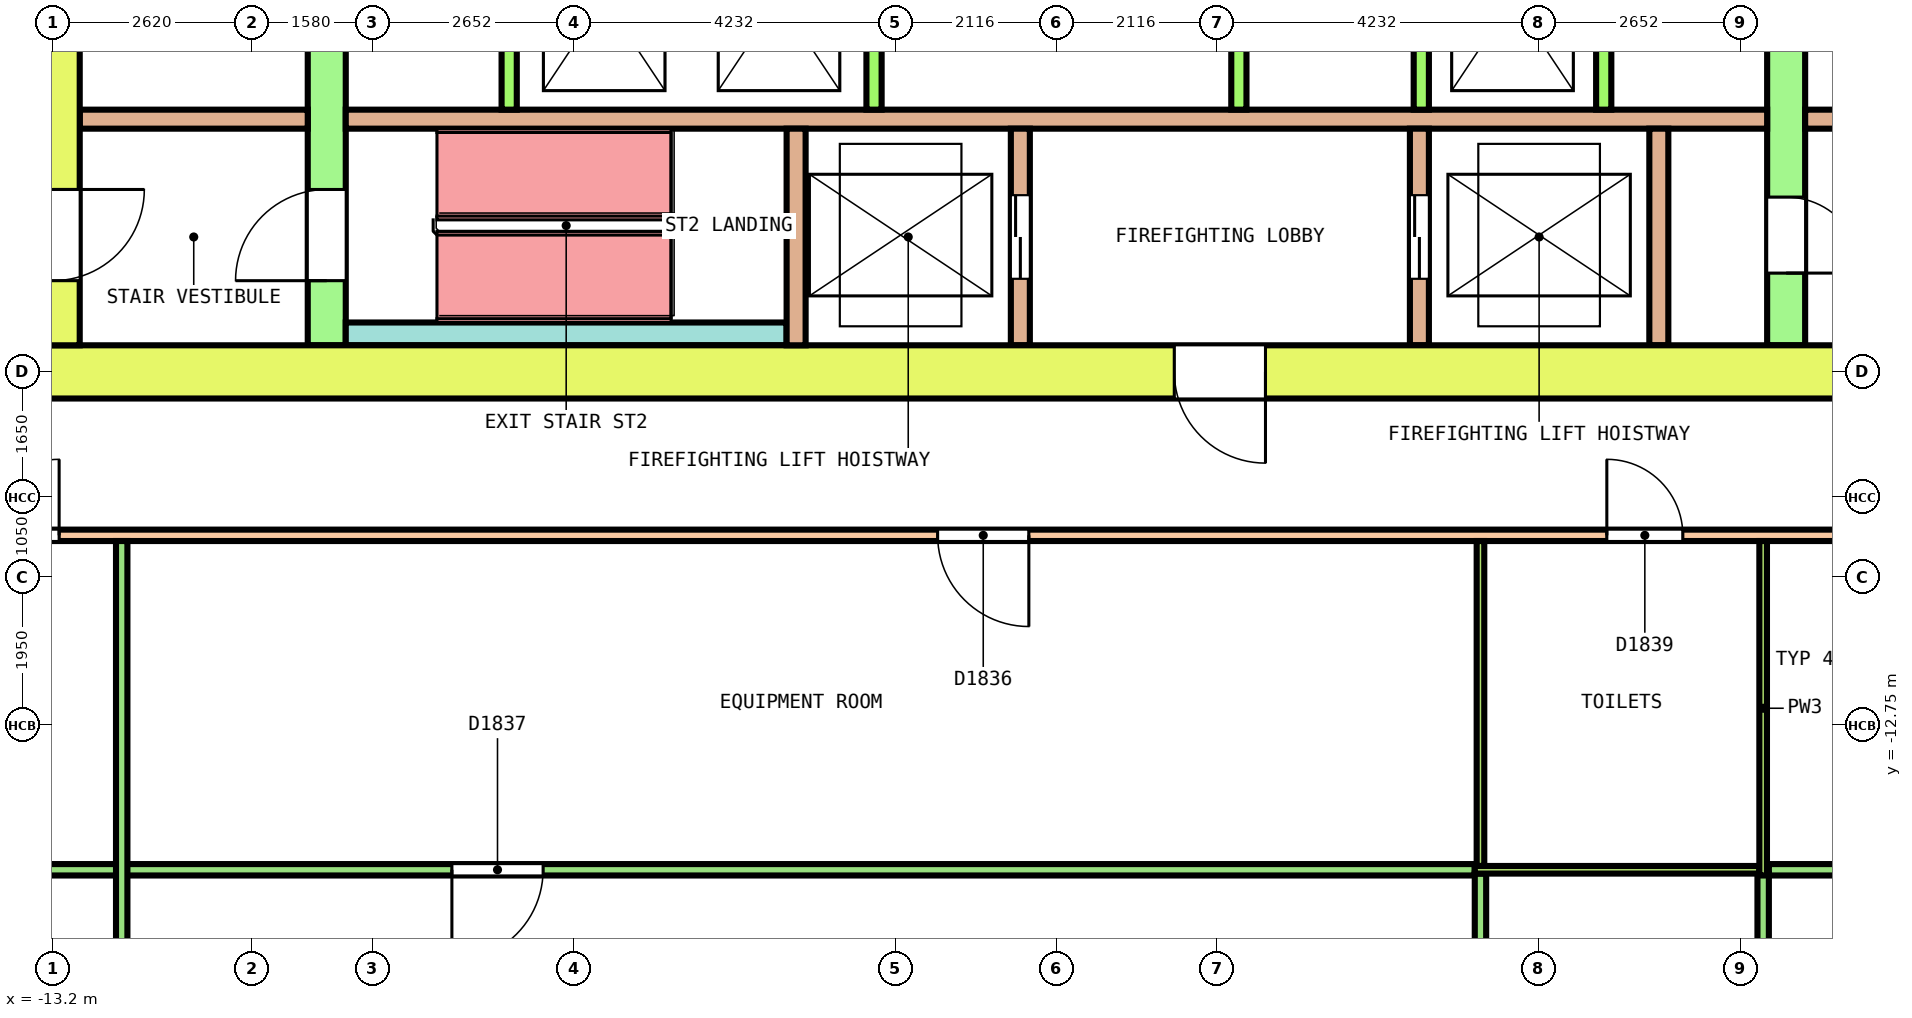
"""IFC4 building model, lengths in metres.
Left out: names, types, materials, properties, quantities, classifications, styles, units other than length and angle.
Written with IfcOpenShell. Run it as: python <this file> out.ifc"""

import sys

from ifc_helpers import new_model, si_unit, direction, frame, frame_2d, origin, place, context, subcontext, project, spatial, rectangle, extrude, element, fill, save


model = new_model("IFC4")
c1 = context("Model", 3, precision=1e-05, world=origin(), true_north=direction((0.0, 1.0)))
c2 = subcontext(c1, "Body", "Model", "MODEL_VIEW")
j1 = project(units=[si_unit("LENGTHUNIT", "METRE"), si_unit("PLANEANGLEUNIT", "RADIAN")], contexts=[c1])
p1 = place(None, origin())
s1 = spatial("IfcSite", under=j1, at=p1, CompositionType="ELEMENT")
p2 = place(p1, origin())
s2 = spatial("IfcBuilding", under=s1, at=p2, CompositionType="ELEMENT")
p3 = place(p2, frame((0.0, 0.0, 176.0)))
s3 = spatial("IfcBuildingStorey", under=s2, at=p3, CompositionType="ELEMENT", Elevation=176.0)
p4 = place(p3, frame((-13.55, -8.1, 0.0), z_axis=(0.0, 0.0, 1.0), x_axis=(1.0, 0.0, 0.0)))
e1 = element("IfcWall", 1, at=p4, inside=s3, PredefinedType="SHEAR", context=c2, shape_type="SweptSolid", body=[
    extrude(rectangle(XDim=27.1, YDim=0.7, at=frame_2d((13.55, 0.0))), origin(), (0.0, 0.0, 1.0), 4.1),
])
p5 = place(p4, frame((15.1, 0.0, 0.0)))
e2 = element("IfcOpeningElement", 2, at=p5, cuts=e1, PredefinedType="OPENING", context=c2, shape_type="SweptSolid", body=[
    extrude(rectangle(XDim=1.2, YDim=2.1, at=frame_2d((0.6, 1.05))), frame((0.0, 0.36, 0.0), z_axis=(0.0, -1.0, 0.0), x_axis=(1.0, 0.0, 0.0)), (0.0, 0.0, 1.0), 0.72),
])
p6 = place(p3, frame((-13.2, -7.75, 0.0), z_axis=(0.0, 0.0, 1.0), x_axis=(0.0, 1.0, 0.0)))
e3 = element("IfcWall", 3, at=p6, inside=s3, PredefinedType="SHEAR", context=c2, shape_type="SweptSolid", body=[
    extrude(rectangle(XDim=15.5, YDim=0.7, at=frame_2d((7.75, 0.0))), origin(), (0.0, 0.0, 1.0), 4.1),
])
p7 = place(p6, frame((6.55, 0.0, 0.0)))
e4 = element("IfcOpeningElement", 4, at=p7, cuts=e3, PredefinedType="OPENING", context=c2, shape_type="SweptSolid", body=[
    extrude(rectangle(XDim=2.4, YDim=2.1, at=frame_2d((1.2, 1.05))), frame((0.0, 0.36, 0.0), z_axis=(0.0, -1.0, 0.0), x_axis=(1.0, 0.0, 0.0)), (0.0, 0.0, 1.0), 0.72),
])
p8 = place(p6, frame((13.45, 0.0, 0.0)))
e5 = element("IfcOpeningElement", 5, at=p8, cuts=e3, PredefinedType="OPENING", context=c2, shape_type="SweptSolid", body=[
    extrude(rectangle(XDim=1.2, YDim=2.1, at=frame_2d((0.6, 1.05))), frame((0.0, 0.36, 0.0), z_axis=(0.0, -1.0, 0.0), x_axis=(1.0, 0.0, 0.0)), (0.0, 0.0, 1.0), 0.72),
])
p9 = place(p6, frame((0.85, 0.0, 0.0)))
e6 = element("IfcOpeningElement", 6, at=p9, cuts=e3, PredefinedType="OPENING", context=c2, shape_type="SweptSolid", body=[
    extrude(rectangle(XDim=1.2, YDim=2.1, at=frame_2d((0.6, 1.05))), frame((0.0, 0.36, 0.0), z_axis=(0.0, -1.0, 0.0), x_axis=(1.0, 0.0, 0.0)), (0.0, 0.0, 1.0), 0.72),
])
p10 = place(p3, frame((-9.6, -7.75, 0.0), z_axis=(0.0, 0.0, 1.0), x_axis=(0.0, 1.0, 0.0)))
e7 = element("IfcWall", 7, at=p10, inside=s3, PredefinedType="SHEAR", context=c2, shape_type="SweptSolid", body=[
    extrude(rectangle(XDim=15.5, YDim=0.5, at=frame_2d((7.75, 0.0))), origin(), (0.0, 0.0, 1.0), 4.1),
])
p11 = place(p10, frame((6.55, 0.0, 0.0)))
e8 = element("IfcOpeningElement", 8, at=p11, cuts=e7, PredefinedType="OPENING", context=c2, shape_type="SweptSolid", body=[
    extrude(rectangle(XDim=2.4, YDim=2.1, at=frame_2d((1.2, 1.05))), frame((0.0, 0.26, 0.0), z_axis=(0.0, -1.0, 0.0), x_axis=(1.0, 0.0, 0.0)), (0.0, 0.0, 1.0), 0.52),
])
p12 = place(p10, frame((13.45, 0.0, 0.0)))
e9 = element("IfcOpeningElement", 9, at=p12, cuts=e7, PredefinedType="OPENING", context=c2, shape_type="SweptSolid", body=[
    extrude(rectangle(XDim=1.2, YDim=2.1, at=frame_2d((0.6, 1.05))), frame((0.0, 0.26, 0.0), z_axis=(0.0, -1.0, 0.0), x_axis=(1.0, 0.0, 0.0)), (0.0, 0.0, 1.0), 0.52),
])
p13 = place(p10, frame((0.85, 0.0, 0.0)))
e10 = element("IfcOpeningElement", 10, at=p13, cuts=e7, PredefinedType="OPENING", context=c2, shape_type="SweptSolid", body=[
    extrude(rectangle(XDim=1.2, YDim=2.1, at=frame_2d((0.6, 1.05))), frame((0.0, 0.26, 0.0), z_axis=(0.0, -1.0, 0.0), x_axis=(1.0, 0.0, 0.0)), (0.0, 0.0, 1.0), 0.52),
])
p14 = place(p3, frame((9.6, -7.75, 0.0), z_axis=(0.0, 0.0, 1.0), x_axis=(0.0, 1.0, 0.0)))
e11 = element("IfcWall", 11, at=p14, inside=s3, PredefinedType="SHEAR", context=c2, shape_type="SweptSolid", body=[
    extrude(rectangle(XDim=15.5, YDim=0.5, at=frame_2d((7.75, 0.0))), origin(), (0.0, 0.0, 1.0), 4.1),
])
p15 = place(p14, frame((6.55, 0.0, 0.0)))
e12 = element("IfcOpeningElement", 12, at=p15, cuts=e11, PredefinedType="OPENING", context=c2, shape_type="SweptSolid", body=[
    extrude(rectangle(XDim=2.4, YDim=2.1, at=frame_2d((1.2, 1.05))), frame((0.0, 0.26, 0.0), z_axis=(0.0, -1.0, 0.0), x_axis=(1.0, 0.0, 0.0)), (0.0, 0.0, 1.0), 0.52),
])
p16 = place(p14, frame((13.45, 0.0, 0.0)))
e13 = element("IfcOpeningElement", 13, at=p16, cuts=e11, PredefinedType="OPENING", context=c2, shape_type="SweptSolid", body=[
    extrude(rectangle(XDim=1.2, YDim=2.1, at=frame_2d((0.6, 1.05))), frame((0.0, 0.26, 0.0), z_axis=(0.0, -1.0, 0.0), x_axis=(1.0, 0.0, 0.0)), (0.0, 0.0, 1.0), 0.52),
])
p17 = place(p14, frame((0.95, 0.0, 0.0)))
e14 = element("IfcOpeningElement", 14, at=p17, cuts=e11, PredefinedType="OPENING", context=c2, shape_type="SweptSolid", body=[
    extrude(rectangle(XDim=1.0, YDim=2.1, at=frame_2d((0.5, 1.05))), frame((0.0, 0.26, 0.0), z_axis=(0.0, -1.0, 0.0), x_axis=(1.0, 0.0, 0.0)), (0.0, 0.0, 1.0), 0.52),
])
p18 = place(p3, frame((-12.85, -4.775, 0.0), z_axis=(0.0, 0.0, 1.0), x_axis=(1.0, 0.0, 0.0)))
e15 = element("IfcWall", 15, at=p18, inside=s3, PredefinedType="SOLIDWALL", context=c2, shape_type="SweptSolid", body=[
    extrude(rectangle(XDim=3.0, YDim=0.25, at=frame_2d((1.5, 0.0))), origin(), (0.0, 0.0, 1.0), 4.1),
])
p19 = place(p3, frame((-9.35, -4.775, 0.0), z_axis=(0.0, 0.0, 1.0), x_axis=(1.0, 0.0, 0.0)))
e16 = element("IfcWall", 16, at=p19, inside=s3, PredefinedType="SOLIDWALL", context=c2, shape_type="SweptSolid", body=[
    extrude(rectangle(XDim=18.7, YDim=0.25, at=frame_2d((9.35, 0.0))), origin(), (0.0, 0.0, 1.0), 4.1),
])
p20 = place(p3, frame((9.85, -4.775, 0.0), z_axis=(0.0, 0.0, 1.0), x_axis=(1.0, 0.0, 0.0)))
e17 = element("IfcWall", 17, at=p20, inside=s3, PredefinedType="SOLIDWALL", context=c2, shape_type="SweptSolid", body=[
    extrude(rectangle(XDim=3.0, YDim=0.25, at=frame_2d((1.5, 0.0))), origin(), (0.0, 0.0, 1.0), 4.1),
])
for number, where, z_axis, x_axis in (
    (18, (-7.2, -4.65, 0.0), (0.0, 0.0, 1.0), (0.0, 1.0, 0.0)),
    (19, (-2.4, -4.65, 0.0), (0.0, 0.0, 1.0), (0.0, 1.0, 0.0)),
    (20, (2.4, -4.65, 0.0), (0.0, 0.0, 1.0), (0.0, 1.0, 0.0)),
    (21, (4.8, -4.65, 0.0), (0.0, 0.0, 1.0), (0.0, 1.0, 0.0)),
    (22, (7.2, -4.65, 0.0), (0.0, 0.0, 1.0), (0.0, 1.0, 0.0)),
):
    element("IfcWall", number, at=place(p3, frame(where, z_axis=z_axis, x_axis=x_axis)), inside=s3, PredefinedType="SOLIDWALL", context=c2, shape_type="SweptSolid", body=[
        extrude(rectangle(XDim=2.9, YDim=0.2, at=frame_2d((1.45, 0.0))), origin(), (0.0, 0.0, 1.0), 4.1),
    ])
p21 = place(p3, frame((-9.35, -7.6, 0.0), z_axis=(0.0, 0.0, 1.0), x_axis=(1.0, 0.0, 0.0)))
e23 = element("IfcWall", 23, at=p21, inside=s3, PredefinedType="SOLIDWALL", context=c2, shape_type="SweptSolid", body=[
    extrude(rectangle(XDim=5.8, YDim=0.3, at=frame_2d((2.9, 0.0))), origin(), (0.0, 0.0, 1.0), 4.1),
])
p22 = place(p3, frame((-3.425, -7.75, 0.0), z_axis=(0.0, 0.0, 1.0), x_axis=(0.0, 1.0, 0.0)))
e24 = element("IfcWall", 24, at=p22, inside=s3, PredefinedType="SOLIDWALL", context=c2, shape_type="SweptSolid", body=[
    extrude(rectangle(XDim=2.85, YDim=0.25, at=frame_2d((1.425, 0.0))), origin(), (0.0, 0.0, 1.0), 4.1),
])
p23 = place(p3, frame((-0.475, -7.75, 0.0), z_axis=(0.0, 0.0, 1.0), x_axis=(0.0, 1.0, 0.0)))
e25 = element("IfcWall", 25, at=p23, inside=s3, PredefinedType="SOLIDWALL", context=c2, shape_type="SweptSolid", body=[
    extrude(rectangle(XDim=2.85, YDim=0.25, at=frame_2d((1.425, 0.0))), origin(), (0.0, 0.0, 1.0), 4.1),
])
p24 = place(p23, frame((0.875, 0.0, 0.0)))
e26 = element("IfcOpeningElement", 26, at=p24, cuts=e25, PredefinedType="OPENING", context=c2, shape_type="SweptSolid", body=[
    extrude(rectangle(XDim=1.1, YDim=2.1, at=frame_2d((0.55, 1.05))), frame((0.0, 0.135, 0.0), z_axis=(0.0, -1.0, 0.0), x_axis=(1.0, 0.0, 0.0)), (0.0, 0.0, 1.0), 0.27),
])
p25 = place(p3, frame((4.775, -7.75, 0.0), z_axis=(0.0, 0.0, 1.0), x_axis=(0.0, 1.0, 0.0)))
e27 = element("IfcWall", 27, at=p25, inside=s3, PredefinedType="SOLIDWALL", context=c2, shape_type="SweptSolid", body=[
    extrude(rectangle(XDim=2.85, YDim=0.25, at=frame_2d((1.425, 0.0))), origin(), (0.0, 0.0, 1.0), 4.1),
])
p26 = place(p25, frame((0.875, 0.0, 0.0)))
e28 = element("IfcOpeningElement", 28, at=p26, cuts=e27, PredefinedType="OPENING", context=c2, shape_type="SweptSolid", body=[
    extrude(rectangle(XDim=1.1, YDim=2.1, at=frame_2d((0.55, 1.05))), frame((0.0, 0.135, 0.0), z_axis=(0.0, -1.0, 0.0), x_axis=(1.0, 0.0, 0.0)), (0.0, 0.0, 1.0), 0.27),
])
p27 = place(p3, frame((7.925, -7.75, 0.0), z_axis=(0.0, 0.0, 1.0), x_axis=(0.0, 1.0, 0.0)))
e29 = element("IfcWall", 29, at=p27, inside=s3, PredefinedType="SOLIDWALL", context=c2, shape_type="SweptSolid", body=[
    extrude(rectangle(XDim=2.85, YDim=0.25, at=frame_2d((1.425, 0.0))), origin(), (0.0, 0.0, 1.0), 4.1),
])
p28 = place(p3, frame((-15.275, -10.25, 0.0), z_axis=(0.0, 0.0, 1.0), x_axis=(1.0, 0.0, 0.0)))
e30 = element("IfcWall", 30, at=p28, inside=s3, PredefinedType="PARTITIONING", context=c2, shape_type="SweptSolid", body=[
    extrude(rectangle(XDim=30.575, YDim=0.15, at=frame_2d((15.288, 0.0))), origin(), (0.0, 0.0, 1.0), 3.05),
])
p29 = place(p28, frame((1.154, 0.0, 0.0)))
e31 = element("IfcOpeningElement", 31, at=p29, cuts=e30, PredefinedType="OPENING", context=c2, shape_type="SweptSolid", body=[
    extrude(rectangle(XDim=1.0, YDim=2.1, at=frame_2d((0.5, 1.05))), frame((0.0, 0.085, 0.0), z_axis=(0.0, -1.0, 0.0), x_axis=(1.0, 0.0, 0.0)), (0.0, 0.0, 1.0), 0.17),
])
p30 = place(p28, frame((13.712, 0.0, 0.0)))
e32 = element("IfcOpeningElement", 32, at=p30, cuts=e30, PredefinedType="OPENING", context=c2, shape_type="SweptSolid", body=[
    extrude(rectangle(XDim=1.2, YDim=2.1, at=frame_2d((0.6, 1.05))), frame((0.0, 0.085, 0.0), z_axis=(0.0, -1.0, 0.0), x_axis=(1.0, 0.0, 0.0)), (0.0, 0.0, 1.0), 0.17),
])
p31 = place(p28, frame((22.516, 0.0, 0.0)))
e33 = element("IfcOpeningElement", 33, at=p31, cuts=e30, PredefinedType="OPENING", context=c2, shape_type="SweptSolid", body=[
    extrude(rectangle(XDim=1.0, YDim=2.1, at=frame_2d((0.5, 1.05))), frame((0.0, 0.085, 0.0), z_axis=(0.0, -1.0, 0.0), x_axis=(1.0, 0.0, 0.0)), (0.0, 0.0, 1.0), 0.17),
])
p32 = place(p28, frame((28.187, 0.0, 0.0)))
e34 = element("IfcOpeningElement", 34, at=p32, cuts=e30, PredefinedType="OPENING", context=c2, shape_type="SweptSolid", body=[
    extrude(rectangle(XDim=1.0, YDim=2.1, at=frame_2d((0.5, 1.05))), frame((0.0, 0.085, 0.0), z_axis=(0.0, -1.0, 0.0), x_axis=(1.0, 0.0, 0.0)), (0.0, 0.0, 1.0), 0.17),
])
p33 = place(p3, frame((-19.024, -14.65, 0.0), z_axis=(0.0, 0.0, 1.0), x_axis=(1.0, 0.0, 0.0)))
e35 = element("IfcWall", 35, at=p33, inside=s3, PredefinedType="PARTITIONING", context=c2, shape_type="SweptSolid", body=[
    extrude(rectangle(XDim=24.527, YDim=0.15, at=frame_2d((12.264, 0.0))), origin(), (0.0, 0.0, 1.0), 3.05),
])
p34 = place(p33, frame((2.863, 0.0, 0.0)))
e36 = element("IfcOpeningElement", 36, at=p34, cuts=e35, PredefinedType="OPENING", context=c2, shape_type="SweptSolid", body=[
    extrude(rectangle(XDim=1.0, YDim=2.1, at=frame_2d((0.5, 1.05))), frame((0.0, 0.085, 0.0), z_axis=(0.0, -1.0, 0.0), x_axis=(1.0, 0.0, 0.0)), (0.0, 0.0, 1.0), 0.17),
])
p35 = place(p33, frame((11.07, 0.0, 0.0)))
e37 = element("IfcOpeningElement", 37, at=p35, cuts=e35, PredefinedType="OPENING", context=c2, shape_type="SweptSolid", body=[
    extrude(rectangle(XDim=1.2, YDim=2.1, at=frame_2d((0.6, 1.05))), frame((0.0, 0.085, 0.0), z_axis=(0.0, -1.0, 0.0), x_axis=(1.0, 0.0, 0.0)), (0.0, 0.0, 1.0), 0.17),
])
p36 = place(p3, frame((9.373, -14.65, 0.0), z_axis=(0.0, 0.0, 1.0), x_axis=(1.0, 0.0, 0.0)))
e38 = element("IfcWall", 38, at=p36, inside=s3, PredefinedType="PARTITIONING", context=c2, shape_type="SweptSolid", body=[
    extrude(rectangle(XDim=9.651, YDim=0.15, at=frame_2d((4.826, 0.0))), origin(), (0.0, 0.0, 1.0), 3.05),
])
p37 = place(p3, frame((-12.298, -23.005, 0.0), z_axis=(0.0, 0.0, 1.0), x_axis=(0.0, 1.0, 0.0)))
e39 = element("IfcWall", 39, at=p37, inside=s3, PredefinedType="PARTITIONING", context=c2, shape_type="SweptSolid", body=[
    extrude(rectangle(XDim=12.68, YDim=0.15, at=frame_2d((6.34, 0.0))), origin(), (0.0, 0.0, 1.0), 3.05),
])
p38 = place(p3, frame((5.579, -24.768, 0.0), z_axis=(0.0, 0.0, 1.0), x_axis=(0.0, 1.0, 0.0)))
e40 = element("IfcWall", 40, at=p38, inside=s3, PredefinedType="PARTITIONING", context=c2, shape_type="SweptSolid", body=[
    extrude(rectangle(XDim=10.068, YDim=0.15, at=frame_2d((5.034, 0.0))), origin(), (0.0, 0.0, 1.0), 3.05),
])
p39 = place(p38, frame((4.559, 0.0, 0.0)))
e41 = element("IfcOpeningElement", 41, at=p39, cuts=e40, PredefinedType="OPENING", context=c2, shape_type="SweptSolid", body=[
    extrude(rectangle(XDim=1.0, YDim=2.1, at=frame_2d((0.5, 1.05))), frame((0.0, 0.085, 0.0), z_axis=(0.0, -1.0, 0.0), x_axis=(1.0, 0.0, 0.0)), (0.0, 0.0, 1.0), 0.17),
])
p40 = place(p3, frame((9.298, -24.737, 0.0), z_axis=(0.0, 0.0, 1.0), x_axis=(0.0, 1.0, 0.0)))
e42 = element("IfcWall", 42, at=p40, inside=s3, PredefinedType="PARTITIONING", context=c2, shape_type="SweptSolid", body=[
    extrude(rectangle(XDim=10.037, YDim=0.15, at=frame_2d((5.019, 0.0))), origin(), (0.0, 0.0, 1.0), 3.05),
])
p41 = place(p40, frame((4.444, 0.0, 0.0)))
e43 = element("IfcOpeningElement", 43, at=p41, cuts=e42, PredefinedType="OPENING", context=c2, shape_type="SweptSolid", body=[
    extrude(rectangle(XDim=1.2, YDim=2.1, at=frame_2d((0.6, 1.05))), frame((0.0, 0.085, 0.0), z_axis=(0.0, -1.0, 0.0), x_axis=(1.0, 0.0, 0.0)), (0.0, 0.0, 1.0), 0.17),
])
p42 = place(p3, frame((5.579, -14.6, 0.0), z_axis=(0.0, 0.0, 1.0), x_axis=(0.0, 1.0, 0.0)))
e44 = element("IfcWall", 44, at=p42, inside=s3, PredefinedType="PARTITIONING", context=c2, shape_type="SweptSolid", body=[
    extrude(rectangle(XDim=4.275, YDim=0.1, at=frame_2d((2.138, 0.0))), origin(), (0.0, 0.0, 1.0), 3.05),
])
p43 = place(p3, frame((5.503, -14.65, 0.0), z_axis=(0.0, 0.0, 1.0), x_axis=(1.0, 0.0, 0.0)))
e45 = element("IfcWall", 45, at=p43, inside=s3, PredefinedType="PARTITIONING", context=c2, shape_type="SweptSolid", body=[
    extrude(rectangle(XDim=3.744, YDim=0.1, at=frame_2d((1.872, 0.0))), origin(), (0.0, 0.0, 1.0), 3.05),
])
p44 = place(p3, frame((9.298, -14.725, 0.0), z_axis=(0.0, 0.0, 1.0), x_axis=(0.0, 1.0, 0.0)))
e46 = element("IfcWall", 46, at=p44, inside=s3, PredefinedType="PARTITIONING", context=c2, shape_type="SweptSolid", body=[
    extrude(rectangle(XDim=4.4, YDim=0.1, at=frame_2d((2.2, 0.0))), origin(), (0.0, 0.0, 1.0), 3.05),
])
p45 = place(p24, origin())
e47 = element("IfcDoor", 47, at=p45, inside=s3, OperationType="DOUBLE_DOOR_SLIDING", PredefinedType="DOOR", context=c2, shape_type="SweptSolid", body=[
    extrude(rectangle(XDim=1.1, YDim=2.1, at=frame_2d((0.55, 1.05))), frame((0.0, 0.075, 0.0), z_axis=(0.0, -1.0, 0.0), x_axis=(1.0, 0.0, 0.0)), (0.0, 0.0, 1.0), 0.15),
])
fill(e26, e47)
p46 = place(p26, origin())
e48 = element("IfcDoor", 48, at=p46, inside=s3, OperationType="DOUBLE_DOOR_SLIDING", PredefinedType="DOOR", context=c2, shape_type="SweptSolid", body=[
    extrude(rectangle(XDim=1.1, YDim=2.1, at=frame_2d((0.55, 1.05))), frame((0.0, 0.075, 0.0), z_axis=(0.0, -1.0, 0.0), x_axis=(1.0, 0.0, 0.0)), (0.0, 0.0, 1.0), 0.15),
])
fill(e28, e48)
p47 = place(p13, origin())
e49 = element("IfcDoor", 49, at=p47, inside=s3, OperationType="SINGLE_SWING_LEFT", PredefinedType="DOOR", context=c2, shape_type="SweptSolid", body=[
    extrude(rectangle(XDim=1.2, YDim=2.1, at=frame_2d((0.6, 1.05))), frame((0.0, 0.2, 0.0), z_axis=(0.0, -1.0, 0.0), x_axis=(1.0, 0.0, 0.0)), (0.0, 0.0, 1.0), 0.4),
])
fill(e10, e49)
p48 = place(p9, origin())
e50 = element("IfcDoor", 50, at=p48, inside=s3, OperationType="SINGLE_SWING_RIGHT", PredefinedType="DOOR", context=c2, shape_type="SweptSolid", body=[
    extrude(rectangle(XDim=1.2, YDim=2.1, at=frame_2d((0.6, 1.05))), frame((0.0, 0.3, 0.0), z_axis=(0.0, -1.0, 0.0), x_axis=(1.0, 0.0, 0.0)), (0.0, 0.0, 1.0), 0.6),
])
fill(e6, e50)
p49 = place(p5, origin())
e51 = element("IfcDoor", 51, at=p49, inside=s3, OperationType="SINGLE_SWING_LEFT", PredefinedType="DOOR", context=c2, shape_type="SweptSolid", body=[
    extrude(rectangle(XDim=1.2, YDim=2.1, at=frame_2d((0.6, 1.05))), frame((0.0, 0.3, 0.0), z_axis=(0.0, -1.0, 0.0), x_axis=(1.0, 0.0, 0.0)), (0.0, 0.0, 1.0), 0.6),
])
fill(e2, e51)
p50 = place(p17, origin())
e52 = element("IfcDoor", 52, at=p50, inside=s3, OperationType="SINGLE_SWING_LEFT", PredefinedType="DOOR", context=c2, shape_type="SweptSolid", body=[
    extrude(rectangle(XDim=1.0, YDim=2.1, at=frame_2d((0.5, 1.05))), frame((0.0, 0.2, 0.0), z_axis=(0.0, -1.0, 0.0), x_axis=(1.0, 0.0, 0.0)), (0.0, 0.0, 1.0), 0.4),
])
fill(e14, e52)
p51 = place(p29, origin())
e53 = element("IfcDoor", 53, at=p51, inside=s3, OperationType="SINGLE_SWING_LEFT", PredefinedType="DOOR", context=c2, shape_type="SweptSolid", body=[
    extrude(rectangle(XDim=1.0, YDim=2.1, at=frame_2d((0.5, 1.05))), frame((0.0, 0.025, 0.0), z_axis=(0.0, -1.0, 0.0), x_axis=(1.0, 0.0, 0.0)), (0.0, 0.0, 1.0), 0.05),
])
fill(e31, e53)
p52 = place(p30, origin())
e54 = element("IfcDoor", 54, at=p52, inside=s3, OperationType="DOUBLE_DOOR_SINGLE_SWING", PredefinedType="DOOR", context=c2, shape_type="SweptSolid", body=[
    extrude(rectangle(XDim=1.2, YDim=2.1, at=frame_2d((0.6, 1.05))), frame((0.0, 0.025, 0.0), z_axis=(0.0, -1.0, 0.0), x_axis=(1.0, 0.0, 0.0)), (0.0, 0.0, 1.0), 0.05),
])
fill(e32, e54)
p53 = place(p35, origin())
e55 = element("IfcDoor", 55, at=p53, inside=s3, OperationType="DOUBLE_DOOR_SINGLE_SWING", PredefinedType="DOOR", context=c2, shape_type="SweptSolid", body=[
    extrude(rectangle(XDim=1.2, YDim=2.1, at=frame_2d((0.6, 1.05))), frame((0.0, 0.025, 0.0), z_axis=(0.0, -1.0, 0.0), x_axis=(1.0, 0.0, 0.0)), (0.0, 0.0, 1.0), 0.05),
])
fill(e37, e55)
p54 = place(p31, origin())
e56 = element("IfcDoor", 56, at=p54, inside=s3, OperationType="SINGLE_SWING_LEFT", PredefinedType="DOOR", context=c2, shape_type="SweptSolid", body=[
    extrude(rectangle(XDim=1.0, YDim=2.1, at=frame_2d((0.5, 1.05))), frame((0.0, 0.025, 0.0), z_axis=(0.0, -1.0, 0.0), x_axis=(1.0, 0.0, 0.0)), (0.0, 0.0, 1.0), 0.05),
])
fill(e33, e56)
save(model, sys.argv[1])
